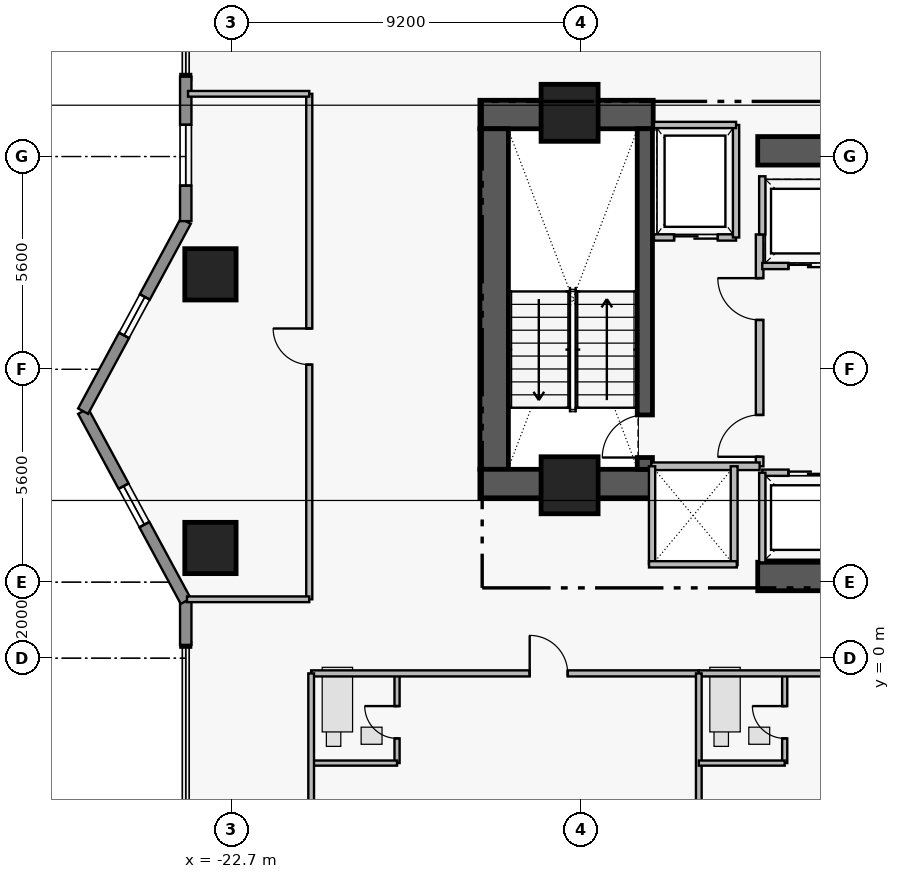
"""IFC4 building model, lengths in metres.
Left out: names, types, materials, properties, quantities, classifications, styles, units other than length and angle.
Written with IfcOpenShell. Run it as: python <this file> out.ifc"""

import sys

from ifc_helpers import new_model, si_unit, direction, frame, frame_2d, origin, origin_2d, place, context, subcontext, project, spatial, rectangle, extrude, element, fill, save


model = new_model("IFC4")
c1 = context("Model", 3, precision=1e-05, world=origin(), true_north=direction((0.0, 1.0)))
c2 = subcontext(c1, "Body", "Model", "MODEL_VIEW")
j1 = project(units=[si_unit("LENGTHUNIT", "METRE"), si_unit("PLANEANGLEUNIT", "RADIAN")], contexts=[c1])
p1 = place(None, origin())
s1 = spatial("IfcSite", under=j1, at=p1, CompositionType="ELEMENT")
p2 = place(p1, origin())
s2 = spatial("IfcBuilding", under=s1, at=p2, CompositionType="ELEMENT")
p3 = place(p2, frame((0.0, 0.0, 143.1)))
s3 = spatial("IfcBuildingStorey", under=s2, at=p3, CompositionType="ELEMENT", Elevation=143.1)
p4 = place(p3, frame((-16.16, 14.305, 0.0), z_axis=(0.0, 0.0, 1.0), x_axis=(1.0, 0.0, 0.0)))
e1 = element("IfcWall", 1, at=p4, inside=s3, PredefinedType="SHEAR", context=c2, shape_type="SweptSolid", body=[
    extrude(rectangle(XDim=4.56, YDim=0.75, at=frame_2d((2.28, 0.0))), origin(), (0.0, 0.0, 1.0), 3.46),
])
p5 = place(p3, frame((-15.785, 4.97, 0.0), z_axis=(0.0, 0.0, 1.0), x_axis=(0.0, 1.0, 0.0)))
e2 = element("IfcWall", 2, at=p5, inside=s3, PredefinedType="SHEAR", context=c2, shape_type="SweptSolid", body=[
    extrude(rectangle(XDim=8.96, YDim=0.75, at=frame_2d((4.48, 0.0))), origin(), (0.0, 0.0, 1.0), 3.46),
])
p6 = place(p3, frame((-16.16, 4.595, 0.0), z_axis=(0.0, 0.0, 1.0), x_axis=(1.0, 0.0, 0.0)))
e3 = element("IfcWall", 3, at=p6, inside=s3, PredefinedType="SHEAR", context=c2, shape_type="SweptSolid", body=[
    extrude(rectangle(XDim=4.56, YDim=0.75, at=frame_2d((2.28, 0.0))), origin(), (0.0, 0.0, 1.0), 3.46),
])
for number, where, z_axis, x_axis in (
    (4, (-8.85, 2.15, 0.0), (0.0, 0.0, 1.0), (1.0, 0.0, 0.0)),
    (5, (-8.85, 13.35, 0.0), (0.0, 0.0, 1.0), (1.0, 0.0, 0.0)),
):
    element("IfcWall", number, at=place(p3, frame(where, z_axis=z_axis, x_axis=x_axis)), inside=s3, PredefinedType="SHEAR", context=c2, shape_type="SweptSolid", body=[
        extrude(rectangle(XDim=7.6, YDim=0.75, at=frame_2d((3.8, 0.0))), origin(), (0.0, 0.0, 1.0), 3.43),
    ])
p7 = place(p3, frame((-11.82, 4.97, 0.0), z_axis=(0.0, 0.0, 1.0), x_axis=(0.0, 1.0, 0.0)))
e6 = element("IfcWall", 6, at=p7, inside=s3, PredefinedType="SHEAR", context=c2, shape_type="SweptSolid", body=[
    extrude(rectangle(XDim=8.96, YDim=0.4, at=frame_2d((4.48, 0.0))), origin(), (0.0, 0.0, 1.0), 3.46),
])
p8 = place(p7, frame((0.31, 0.0, 0.0)))
e7 = element("IfcOpeningElement", 7, at=p8, cuts=e6, PredefinedType="OPENING", context=c2, shape_type="SweptSolid", body=[
    extrude(rectangle(XDim=1.12, YDim=2.22, at=frame_2d((0.56, 1.11))), frame((0.0, 0.21, 0.0), z_axis=(0.0, -1.0, 0.0), x_axis=(1.0, 0.0, 0.0)), (0.0, 0.0, 1.0), 0.42),
])
for number, where, z_axis, x_axis in (
    (8, (-13.8, 14.35, 0.0), (0.0, 0.0, 1.0), (1.0, 0.0, 0.0)),
    (9, (-13.8, 4.55, 0.0), (0.0, 0.0, 1.0), (1.0, 0.0, 0.0)),
):
    element("IfcColumn", number, at=place(p3, frame(where, z_axis=z_axis, x_axis=x_axis)), inside=s3, PredefinedType="COLUMN", context=c2, shape_type="SweptSolid", body=[
        extrude(rectangle(XDim=1.5, YDim=1.5, at=origin_2d()), origin(), (0.0, 0.0, 1.0), 3.65),
    ])
for number, where, z_axis, x_axis in (
    (10, (-23.25, 2.9, 0.0), (0.0, 0.0, 1.0), (1.0, 0.0, 0.0)),
    (11, (-23.25, 10.1, 0.0), (0.0, 0.0, 1.0), (1.0, 0.0, 0.0)),
):
    element("IfcColumn", number, at=place(p3, frame(where, z_axis=z_axis, x_axis=x_axis)), inside=s3, PredefinedType="COLUMN", context=c2, shape_type="SweptSolid", body=[
        extrude(rectangle(XDim=1.35, YDim=1.35, at=origin_2d()), origin(), (0.0, 0.0, 1.0), 3.65),
    ])
p9 = place(p3, frame((-23.9, 0.35, 0.0), z_axis=(0.0, 0.0, 1.0), x_axis=(0.0, 1.0, 0.0)))
e12 = element("IfcWall", 12, at=p9, inside=s3, PredefinedType="STANDARD", context=c2, shape_type="SweptSolid", body=[
    extrude(rectangle(XDim=1.15, YDim=0.3, at=frame_2d((0.575, 0.0))), origin(), (0.0, 0.0, 1.0), 3.43),
])
p10 = place(p3, frame((-23.9, 1.5, 0.0), z_axis=(0.0, 0.0, 1.0), x_axis=(-0.475175525499, 0.879891027325, 0.0)))
e13 = element("IfcWall", 13, at=p10, inside=s3, PredefinedType="STANDARD", context=c2, shape_type="SweptSolid", body=[
    extrude(rectangle(XDim=5.683, YDim=0.3, at=frame_2d((2.841, 0.0))), origin(), (0.0, 0.0, 1.0), 3.43),
])
p11 = place(p10, frame((2.29, 0.0, 1.25)))
e14 = element("IfcOpeningElement", 14, at=p11, cuts=e13, PredefinedType="OPENING", context=c2, shape_type="SweptSolid", body=[
    extrude(rectangle(XDim=1.15, YDim=1.55, at=frame_2d((0.575, 0.775))), frame((0.0, 0.16, 0.0), z_axis=(0.0, -1.0, 0.0), x_axis=(1.0, 0.0, 0.0)), (0.0, 0.0, 1.0), 0.32),
])
p12 = place(p3, frame((-26.6, 6.5, 0.0), z_axis=(0.0, 0.0, 1.0), x_axis=(0.475175525499, 0.879891027325, 0.0)))
e15 = element("IfcWall", 15, at=p12, inside=s3, PredefinedType="STANDARD", context=c2, shape_type="SweptSolid", body=[
    extrude(rectangle(XDim=5.683, YDim=0.3, at=frame_2d((2.841, 0.0))), origin(), (0.0, 0.0, 1.0), 3.43),
])
p13 = place(p12, frame((2.266, 0.0, 1.25)))
e16 = element("IfcOpeningElement", 16, at=p13, cuts=e15, PredefinedType="OPENING", context=c2, shape_type="SweptSolid", body=[
    extrude(rectangle(XDim=1.15, YDim=1.55, at=frame_2d((0.575, 0.775))), frame((0.0, 0.16, 0.0), z_axis=(0.0, -1.0, 0.0), x_axis=(1.0, 0.0, 0.0)), (0.0, 0.0, 1.0), 0.32),
])
p14 = place(p3, frame((-23.9, 11.5, 0.0), z_axis=(0.0, 0.0, 1.0), x_axis=(0.0, 1.0, 0.0)))
e17 = element("IfcWall", 17, at=p14, inside=s3, PredefinedType="STANDARD", context=c2, shape_type="SweptSolid", body=[
    extrude(rectangle(XDim=3.8, YDim=0.3, at=frame_2d((1.9, 0.0))), origin(), (0.0, 0.0, 1.0), 3.43),
])
p15 = place(p14, frame((0.935, 0.0, 0.85)))
e18 = element("IfcOpeningElement", 18, at=p15, cuts=e17, PredefinedType="OPENING", context=c2, shape_type="SweptSolid", body=[
    extrude(rectangle(XDim=1.6, YDim=1.8, at=frame_2d((0.8, 0.9))), frame((0.0, 0.16, 0.0), z_axis=(0.0, -1.0, 0.0), x_axis=(1.0, 0.0, 0.0)), (0.0, 0.0, 1.0), 0.32),
])
p16 = place(p3, frame((-8.8, 5.05, 0.0), z_axis=(0.0, 0.0, 1.0), x_axis=(0.0, 1.0, 0.0)))
e19 = element("IfcWall", 19, at=p16, inside=s3, PredefinedType="PARTITIONING", context=c2, shape_type="SweptSolid", body=[
    extrude(rectangle(XDim=6.1, YDim=0.2, at=frame_2d((3.05, 0.0))), origin(), (0.0, 0.0, 1.0), 3.43),
])
p17 = place(p16, frame((0.25, 0.0, 0.0)))
e20 = element("IfcOpeningElement", 20, at=p17, cuts=e19, PredefinedType="OPENING", context=c2, shape_type="SweptSolid", body=[
    extrude(rectangle(XDim=1.1, YDim=2.2, at=frame_2d((0.55, 1.1))), frame((0.0, 0.11, 0.0), z_axis=(0.0, -1.0, 0.0), x_axis=(1.0, 0.0, 0.0)), (0.0, 0.0, 1.0), 0.22),
])
p18 = place(p16, frame((3.85, 0.0, 0.0)))
e21 = element("IfcOpeningElement", 21, at=p18, cuts=e19, PredefinedType="OPENING", context=c2, shape_type="SweptSolid", body=[
    extrude(rectangle(XDim=1.1, YDim=2.2, at=frame_2d((0.55, 1.1))), frame((0.0, 0.11, 0.0), z_axis=(0.0, -1.0, 0.0), x_axis=(1.0, 0.0, 0.0)), (0.0, 0.0, 1.0), 0.22),
])
p19 = place(p3, frame((-11.58, 11.07, 0.0), z_axis=(0.0, 0.0, 1.0), x_axis=(1.0, 0.0, 0.0)))
e22 = element("IfcWall", 22, at=p19, inside=s3, PredefinedType="PARTITIONING", context=c2, shape_type="SweptSolid", body=[
    extrude(rectangle(XDim=2.16, YDim=0.165, at=frame_2d((1.08, 0.0))), origin(), (0.0, 0.0, 1.0), 3.43),
])
p20 = place(p19, frame((0.53, 0.0, 0.0)))
e23 = element("IfcOpeningElement", 23, at=p20, cuts=e22, PredefinedType="OPENING", context=c2, shape_type="SweptSolid", body=[
    extrude(rectangle(XDim=1.15, YDim=2.25, at=frame_2d((0.575, 1.125))), frame((0.0, 0.093, 0.0), z_axis=(0.0, -1.0, 0.0), x_axis=(1.0, 0.0, 0.0)), (0.0, 0.0, 1.0), 0.185),
])
p21 = place(p3, frame((-8.73, 4.88, 0.0), z_axis=(0.0, 0.0, 1.0), x_axis=(1.0, 0.0, 0.0)))
e24 = element("IfcWall", 24, at=p21, inside=s3, PredefinedType="PARTITIONING", context=c2, shape_type="SweptSolid", body=[
    extrude(rectangle(XDim=2.48, YDim=0.165, at=frame_2d((1.24, 0.0))), origin(), (0.0, 0.0, 1.0), 3.43),
])
p22 = place(p21, frame((0.69, 0.0, 0.0)))
e25 = element("IfcOpeningElement", 25, at=p22, cuts=e24, PredefinedType="OPENING", context=c2, shape_type="SweptSolid", body=[
    extrude(rectangle(XDim=1.1, YDim=2.25, at=frame_2d((0.55, 1.125))), frame((0.0, 0.093, 0.0), z_axis=(0.0, -1.0, 0.0), x_axis=(1.0, 0.0, 0.0)), (0.0, 0.0, 1.0), 0.185),
])
p23 = place(p3, frame((-8.73, 10.32, 0.0), z_axis=(0.0, 0.0, 1.0), x_axis=(1.0, 0.0, 0.0)))
e26 = element("IfcWall", 26, at=p23, inside=s3, PredefinedType="PARTITIONING", context=c2, shape_type="SweptSolid", body=[
    extrude(rectangle(XDim=2.48, YDim=0.165, at=frame_2d((1.24, 0.0))), origin(), (0.0, 0.0, 1.0), 3.43),
])
p24 = place(p23, frame((0.69, 0.0, 0.0)))
e27 = element("IfcOpeningElement", 27, at=p24, cuts=e26, PredefinedType="OPENING", context=c2, shape_type="SweptSolid", body=[
    extrude(rectangle(XDim=1.1, YDim=2.25, at=frame_2d((0.55, 1.125))), frame((0.0, 0.093, 0.0), z_axis=(0.0, -1.0, 0.0), x_axis=(1.0, 0.0, 0.0)), (0.0, 0.0, 1.0), 0.185),
])
p25 = place(p3, frame((-18.34, -2.76, 0.0), z_axis=(0.0, 0.0, 1.0), x_axis=(0.0, 1.0, 0.0)))
e28 = element("IfcWall", 28, at=p25, inside=s3, PredefinedType="PLUMBINGWALL", context=c2, shape_type="SweptSolid", body=[
    extrude(rectangle(XDim=2.36, YDim=0.135, at=frame_2d((1.18, 0.0))), origin(), (0.0, 0.0, 1.0), 3.43),
])
p26 = place(p25, frame((0.65, 0.0, 0.0)))
e29 = element("IfcOpeningElement", 29, at=p26, cuts=e28, PredefinedType="OPENING", context=c2, shape_type="SweptSolid", body=[
    extrude(rectangle(XDim=0.85, YDim=2.1, at=frame_2d((0.425, 1.05))), frame((0.0, 0.077, 0.0), z_axis=(0.0, -1.0, 0.0), x_axis=(1.0, 0.0, 0.0)), (0.0, 0.0, 1.0), 0.155),
])
p27 = place(p3, frame((-20.6, -0.4, 0.0), z_axis=(0.0, 0.0, 1.0), x_axis=(1.0, 0.0, 0.0)))
e30 = element("IfcWall", 30, at=p27, inside=s3, PredefinedType="PARTITIONING", context=c2, shape_type="SweptSolid", body=[
    extrude(rectangle(XDim=10.2, YDim=0.16, at=frame_2d((5.1, 0.0))), origin(), (0.0, 0.0, 1.0), 3.43),
])
p28 = place(p27, frame((5.75, 0.0, 0.0)))
e31 = element("IfcOpeningElement", 31, at=p28, cuts=e30, PredefinedType="OPENING", context=c2, shape_type="SweptSolid", body=[
    extrude(rectangle(XDim=1.0, YDim=2.15, at=frame_2d((0.5, 1.075))), frame((0.0, 0.09, 0.0), z_axis=(0.0, -1.0, 0.0), x_axis=(1.0, 0.0, 0.0)), (0.0, 0.0, 1.0), 0.18),
])
p29 = place(p3, frame((-8.14, -2.76, 0.0), z_axis=(0.0, 0.0, 1.0), x_axis=(0.0, 1.0, 0.0)))
e32 = element("IfcWall", 32, at=p29, inside=s3, PredefinedType="PLUMBINGWALL", context=c2, shape_type="SweptSolid", body=[
    extrude(rectangle(XDim=2.36, YDim=0.135, at=frame_2d((1.18, 0.0))), origin(), (0.0, 0.0, 1.0), 3.43),
])
p30 = place(p29, frame((0.65, 0.0, 0.0)))
e33 = element("IfcOpeningElement", 33, at=p30, cuts=e32, PredefinedType="OPENING", context=c2, shape_type="SweptSolid", body=[
    extrude(rectangle(XDim=0.85, YDim=2.1, at=frame_2d((0.425, 1.05))), frame((0.0, 0.077, 0.0), z_axis=(0.0, -1.0, 0.0), x_axis=(1.0, 0.0, 0.0)), (0.0, 0.0, 1.0), 0.155),
])
p31 = place(p3, frame((-10.4, -0.4, 0.0), z_axis=(0.0, 0.0, 1.0), x_axis=(1.0, 0.0, 0.0)))
e34 = element("IfcWall", 34, at=p31, inside=s3, PredefinedType="PARTITIONING", context=c2, shape_type="SweptSolid", body=[
    extrude(rectangle(XDim=9.6, YDim=0.16, at=frame_2d((4.8, 0.0))), origin(), (0.0, 0.0, 1.0), 3.43),
])
p32 = place(p31, frame((5.45, 0.0, 0.0)))
e35 = element("IfcOpeningElement", 35, at=p32, cuts=e34, PredefinedType="OPENING", context=c2, shape_type="SweptSolid", body=[
    extrude(rectangle(XDim=1.0, YDim=2.15, at=frame_2d((0.5, 1.075))), frame((0.0, 0.09, 0.0), z_axis=(0.0, -1.0, 0.0), x_axis=(1.0, 0.0, 0.0)), (0.0, 0.0, 1.0), 0.18),
])
p33 = place(p3, frame((-20.65, 1.55, 0.0), z_axis=(0.0, 0.0, 1.0), x_axis=(0.0, 1.0, 0.0)))
e36 = element("IfcWall", 36, at=p33, inside=s3, PredefinedType="PARTITIONING", context=c2, shape_type="SweptSolid", body=[
    extrude(rectangle(XDim=13.3, YDim=0.16, at=frame_2d((6.65, 0.0))), origin(), (0.0, 0.0, 1.0), 3.43),
])
p34 = place(p33, frame((6.175, 0.0, 0.0)))
e37 = element("IfcOpeningElement", 37, at=p34, cuts=e36, PredefinedType="OPENING", context=c2, shape_type="SweptSolid", body=[
    extrude(rectangle(XDim=0.95, YDim=2.15, at=frame_2d((0.475, 1.075))), frame((0.0, 0.09, 0.0), z_axis=(0.0, -1.0, 0.0), x_axis=(1.0, 0.0, 0.0)), (0.0, 0.0, 1.0), 0.18),
])
p35 = place(p3, frame((-11.65, 5.05, 0.0), z_axis=(0.0, 0.0, 1.0), x_axis=(1.0, 0.0, 0.0)))
e38 = element("IfcWall", 38, at=p35, inside=s3, PredefinedType="PARTITIONING", context=c2, shape_type="SweptSolid", body=[
    extrude(rectangle(XDim=2.85, YDim=0.2, at=frame_2d((1.425, 0.0))), origin(), (0.0, 0.0, 1.0), 3.43),
])
p36 = place(p3, frame((-9.42, 11.07, 0.0), z_axis=(0.0, 0.0, 1.0), x_axis=(0.0, 1.0, 0.0)))
e39 = element("IfcWall", 39, at=p36, inside=s3, PredefinedType="PARTITIONING", context=c2, shape_type="SweptSolid", body=[
    extrude(rectangle(XDim=2.96, YDim=0.165, at=frame_2d((1.48, 0.0))), origin(), (0.0, 0.0, 1.0), 3.43),
])
p37 = place(p3, frame((-11.58, 14.03, 0.0), z_axis=(0.0, 0.0, 1.0), x_axis=(1.0, 0.0, 0.0)))
e40 = element("IfcWall", 40, at=p37, inside=s3, PredefinedType="PARTITIONING", context=c2, shape_type="SweptSolid", body=[
    extrude(rectangle(XDim=2.16, YDim=0.165, at=frame_2d((1.08, 0.0))), origin(), (0.0, 0.0, 1.0), 3.43),
])
p38 = place(p3, frame((-8.73, 2.52, 0.0), z_axis=(0.0, 0.0, 1.0), x_axis=(0.0, 1.0, 0.0)))
e41 = element("IfcWall", 41, at=p38, inside=s3, PredefinedType="PARTITIONING", context=c2, shape_type="SweptSolid", body=[
    extrude(rectangle(XDim=2.36, YDim=0.165, at=frame_2d((1.18, 0.0))), origin(), (0.0, 0.0, 1.0), 3.43),
])
p39 = place(p3, frame((-8.73, 11.15, 0.0), z_axis=(0.0, 0.0, 1.0), x_axis=(0.0, 1.0, 0.0)))
e42 = element("IfcWall", 42, at=p39, inside=s3, PredefinedType="PARTITIONING", context=c2, shape_type="SweptSolid", body=[
    extrude(rectangle(XDim=1.53, YDim=0.165, at=frame_2d((0.765, 0.0))), origin(), (0.0, 0.0, 1.0), 3.43),
])
p40 = place(p3, frame((-9.47, 2.45, 0.0), z_axis=(0.0, 0.0, 1.0), x_axis=(0.0, 1.0, 0.0)))
e43 = element("IfcWall", 43, at=p40, inside=s3, PredefinedType="PARTITIONING", context=c2, shape_type="SweptSolid", body=[
    extrude(rectangle(XDim=2.6, YDim=0.18, at=frame_2d((1.3, 0.0))), origin(), (0.0, 0.0, 1.0), 3.43),
])
p41 = place(p3, frame((-11.63, 2.47, 0.0), z_axis=(0.0, 0.0, 1.0), x_axis=(0.0, 1.0, 0.0)))
e44 = element("IfcWall", 44, at=p41, inside=s3, PredefinedType="PARTITIONING", context=c2, shape_type="SweptSolid", body=[
    extrude(rectangle(XDim=2.58, YDim=0.165, at=frame_2d((1.29, 0.0))), origin(), (0.0, 0.0, 1.0), 3.43),
])
p42 = place(p3, frame((-11.71, 2.47, 0.0), z_axis=(0.0, 0.0, 1.0), x_axis=(1.0, 0.0, 0.0)))
e45 = element("IfcWall", 45, at=p42, inside=s3, PredefinedType="PARTITIONING", context=c2, shape_type="SweptSolid", body=[
    extrude(rectangle(XDim=2.31, YDim=0.165, at=frame_2d((1.155, 0.0))), origin(), (0.0, 0.0, 1.0), 2.03),
])
p43 = place(p3, frame((-20.6, -2.76, 0.0), z_axis=(0.0, 0.0, 1.0), x_axis=(1.0, 0.0, 0.0)))
e46 = element("IfcWall", 46, at=p43, inside=s3, PredefinedType="PLUMBINGWALL", context=c2, shape_type="SweptSolid", body=[
    extrude(rectangle(XDim=2.26, YDim=0.135, at=frame_2d((1.13, 0.0))), origin(), (0.0, 0.0, 1.0), 3.43),
])
p44 = place(p3, frame((-20.6, -11.9, 0.0), z_axis=(0.0, 0.0, 1.0), x_axis=(0.0, 1.0, 0.0)))
e47 = element("IfcWall", 47, at=p44, inside=s3, PredefinedType="PARTITIONING", context=c2, shape_type="SweptSolid", body=[
    extrude(rectangle(XDim=11.5, YDim=0.15, at=frame_2d((5.75, 0.0))), origin(), (0.0, 0.0, 1.0), 3.43),
])
p45 = place(p3, frame((-10.4, -15.32, 0.0), z_axis=(0.0, 0.0, 1.0), x_axis=(0.0, 1.0, 0.0)))
e48 = element("IfcWall", 48, at=p45, inside=s3, PredefinedType="PARTITIONING", context=c2, shape_type="SweptSolid", body=[
    extrude(rectangle(XDim=14.92, YDim=0.15, at=frame_2d((7.46, 0.0))), origin(), (0.0, 0.0, 1.0), 3.43),
])
p46 = place(p3, frame((-10.4, -2.76, 0.0), z_axis=(0.0, 0.0, 1.0), x_axis=(1.0, 0.0, 0.0)))
e49 = element("IfcWall", 49, at=p46, inside=s3, PredefinedType="PLUMBINGWALL", context=c2, shape_type="SweptSolid", body=[
    extrude(rectangle(XDim=2.26, YDim=0.135, at=frame_2d((1.13, 0.0))), origin(), (0.0, 0.0, 1.0), 3.43),
])
p47 = place(p3, frame((-23.867, 1.55, 0.0), z_axis=(0.0, 0.0, 1.0), x_axis=(1.0, 0.0, 0.0)))
e50 = element("IfcWall", 50, at=p47, inside=s3, PredefinedType="PARTITIONING", context=c2, shape_type="SweptSolid", body=[
    extrude(rectangle(XDim=3.217, YDim=0.15, at=frame_2d((1.608, 0.0))), origin(), (0.0, 0.0, 1.0), 3.43),
])
p48 = place(p3, frame((-23.84, 14.85, 0.0), z_axis=(0.0, 0.0, 1.0), x_axis=(1.0, 0.0, 0.0)))
e51 = element("IfcWall", 51, at=p48, inside=s3, PredefinedType="PARTITIONING", context=c2, shape_type="SweptSolid", body=[
    extrude(rectangle(XDim=3.19, YDim=0.15, at=frame_2d((1.595, 0.0))), origin(), (0.0, 0.0, 1.0), 3.43),
])
p49 = place(p11, origin())
e52 = element("IfcWindow", 52, at=p49, inside=s3, PartitioningType="SINGLE_PANEL", PredefinedType="WINDOW", context=c2, shape_type="SweptSolid", body=[
    extrude(rectangle(XDim=1.15, YDim=1.55, at=frame_2d((0.575, 0.775))), frame((0.0, 0.03, 0.0), z_axis=(0.0, -1.0, 0.0), x_axis=(1.0, 0.0, 0.0)), (0.0, 0.0, 1.0), 0.06),
])
fill(e14, e52)
p50 = place(p13, origin())
e53 = element("IfcWindow", 53, at=p50, inside=s3, PartitioningType="SINGLE_PANEL", PredefinedType="WINDOW", context=c2, shape_type="SweptSolid", body=[
    extrude(rectangle(XDim=1.15, YDim=1.55, at=frame_2d((0.575, 0.775))), frame((0.0, 0.03, 0.0), z_axis=(0.0, -1.0, 0.0), x_axis=(1.0, 0.0, 0.0)), (0.0, 0.0, 1.0), 0.06),
])
fill(e16, e53)
p51 = place(p15, origin())
e54 = element("IfcWindow", 54, at=p51, inside=s3, PartitioningType="SINGLE_PANEL", PredefinedType="WINDOW", context=c2, shape_type="SweptSolid", body=[
    extrude(rectangle(XDim=1.6, YDim=1.8, at=frame_2d((0.8, 0.9))), frame((0.0, 0.03, 0.0), z_axis=(0.0, -1.0, 0.0), x_axis=(1.0, 0.0, 0.0)), (0.0, 0.0, 1.0), 0.06),
])
fill(e18, e54)
p52 = place(p8, origin())
e55 = element("IfcDoor", 55, at=p52, inside=s3, OperationType="SINGLE_SWING_LEFT", PredefinedType="DOOR", context=c2, shape_type="SweptSolid", body=[
    extrude(rectangle(XDim=1.12, YDim=2.22, at=frame_2d((0.56, 1.11))), frame((0.0, 0.025, 0.0), z_axis=(0.0, -1.0, 0.0), x_axis=(1.0, 0.0, 0.0)), (0.0, 0.0, 1.0), 0.05),
])
fill(e7, e55)
p53 = place(p17, origin())
e56 = element("IfcDoor", 56, at=p53, inside=s3, OperationType="SINGLE_SWING_LEFT", PredefinedType="DOOR", context=c2, shape_type="SweptSolid", body=[
    extrude(rectangle(XDim=1.1, YDim=2.2, at=frame_2d((0.55, 1.1))), frame((0.0, 0.025, 0.0), z_axis=(0.0, -1.0, 0.0), x_axis=(1.0, 0.0, 0.0)), (0.0, 0.0, 1.0), 0.05),
])
fill(e20, e56)
p54 = place(p18, origin())
e57 = element("IfcDoor", 57, at=p54, inside=s3, OperationType="SINGLE_SWING_RIGHT", PredefinedType="DOOR", context=c2, shape_type="SweptSolid", body=[
    extrude(rectangle(XDim=1.1, YDim=2.2, at=frame_2d((0.55, 1.1))), frame((0.0, 0.025, 0.0), z_axis=(0.0, -1.0, 0.0), x_axis=(1.0, 0.0, 0.0)), (0.0, 0.0, 1.0), 0.05),
])
fill(e21, e57)
p55 = place(p20, origin())
e58 = element("IfcDoor", 58, at=p55, inside=s3, OperationType="SLIDING_TO_LEFT", PredefinedType="DOOR", context=c2, shape_type="SweptSolid", body=[
    extrude(rectangle(XDim=1.15, YDim=2.25, at=frame_2d((0.575, 1.125))), frame((0.0, 0.025, 0.0), z_axis=(0.0, -1.0, 0.0), x_axis=(1.0, 0.0, 0.0)), (0.0, 0.0, 1.0), 0.05),
])
fill(e23, e58)
p56 = place(p22, origin())
e59 = element("IfcDoor", 59, at=p56, inside=s3, OperationType="SLIDING_TO_LEFT", PredefinedType="DOOR", context=c2, shape_type="SweptSolid", body=[
    extrude(rectangle(XDim=1.1, YDim=2.25, at=frame_2d((0.55, 1.125))), frame((0.0, 0.025, 0.0), z_axis=(0.0, -1.0, 0.0), x_axis=(1.0, 0.0, 0.0)), (0.0, 0.0, 1.0), 0.05),
])
fill(e25, e59)
p57 = place(p24, origin())
e60 = element("IfcDoor", 60, at=p57, inside=s3, OperationType="SLIDING_TO_LEFT", PredefinedType="DOOR", context=c2, shape_type="SweptSolid", body=[
    extrude(rectangle(XDim=1.1, YDim=2.25, at=frame_2d((0.55, 1.125))), frame((0.0, 0.025, 0.0), z_axis=(0.0, -1.0, 0.0), x_axis=(1.0, 0.0, 0.0)), (0.0, 0.0, 1.0), 0.05),
])
fill(e27, e60)
p58 = place(p26, origin())
e61 = element("IfcDoor", 61, at=p58, inside=s3, OperationType="SINGLE_SWING_RIGHT", PredefinedType="DOOR", context=c2, shape_type="SweptSolid", body=[
    extrude(rectangle(XDim=0.85, YDim=2.1, at=frame_2d((0.425, 1.05))), frame((0.0, 0.025, 0.0), z_axis=(0.0, -1.0, 0.0), x_axis=(1.0, 0.0, 0.0)), (0.0, 0.0, 1.0), 0.05),
])
fill(e29, e61)
p59 = place(p28, origin())
e62 = element("IfcDoor", 62, at=p59, inside=s3, OperationType="SINGLE_SWING_LEFT", PredefinedType="DOOR", context=c2, shape_type="SweptSolid", body=[
    extrude(rectangle(XDim=1.0, YDim=2.15, at=frame_2d((0.5, 1.075))), frame((0.0, 0.025, 0.0), z_axis=(0.0, -1.0, 0.0), x_axis=(1.0, 0.0, 0.0)), (0.0, 0.0, 1.0), 0.05),
])
fill(e31, e62)
p60 = place(p30, origin())
e63 = element("IfcDoor", 63, at=p60, inside=s3, OperationType="SINGLE_SWING_RIGHT", PredefinedType="DOOR", context=c2, shape_type="SweptSolid", body=[
    extrude(rectangle(XDim=0.85, YDim=2.1, at=frame_2d((0.425, 1.05))), frame((0.0, 0.025, 0.0), z_axis=(0.0, -1.0, 0.0), x_axis=(1.0, 0.0, 0.0)), (0.0, 0.0, 1.0), 0.05),
])
fill(e33, e63)
p61 = place(p34, origin())
e64 = element("IfcDoor", 64, at=p61, inside=s3, OperationType="SINGLE_SWING_RIGHT", PredefinedType="DOOR", context=c2, shape_type="SweptSolid", body=[
    extrude(rectangle(XDim=0.95, YDim=2.15, at=frame_2d((0.475, 1.075))), frame((0.0, 0.025, 0.0), z_axis=(0.0, -1.0, 0.0), x_axis=(1.0, 0.0, 0.0)), (0.0, 0.0, 1.0), 0.05),
])
fill(e37, e64)
save(model, sys.argv[1])
